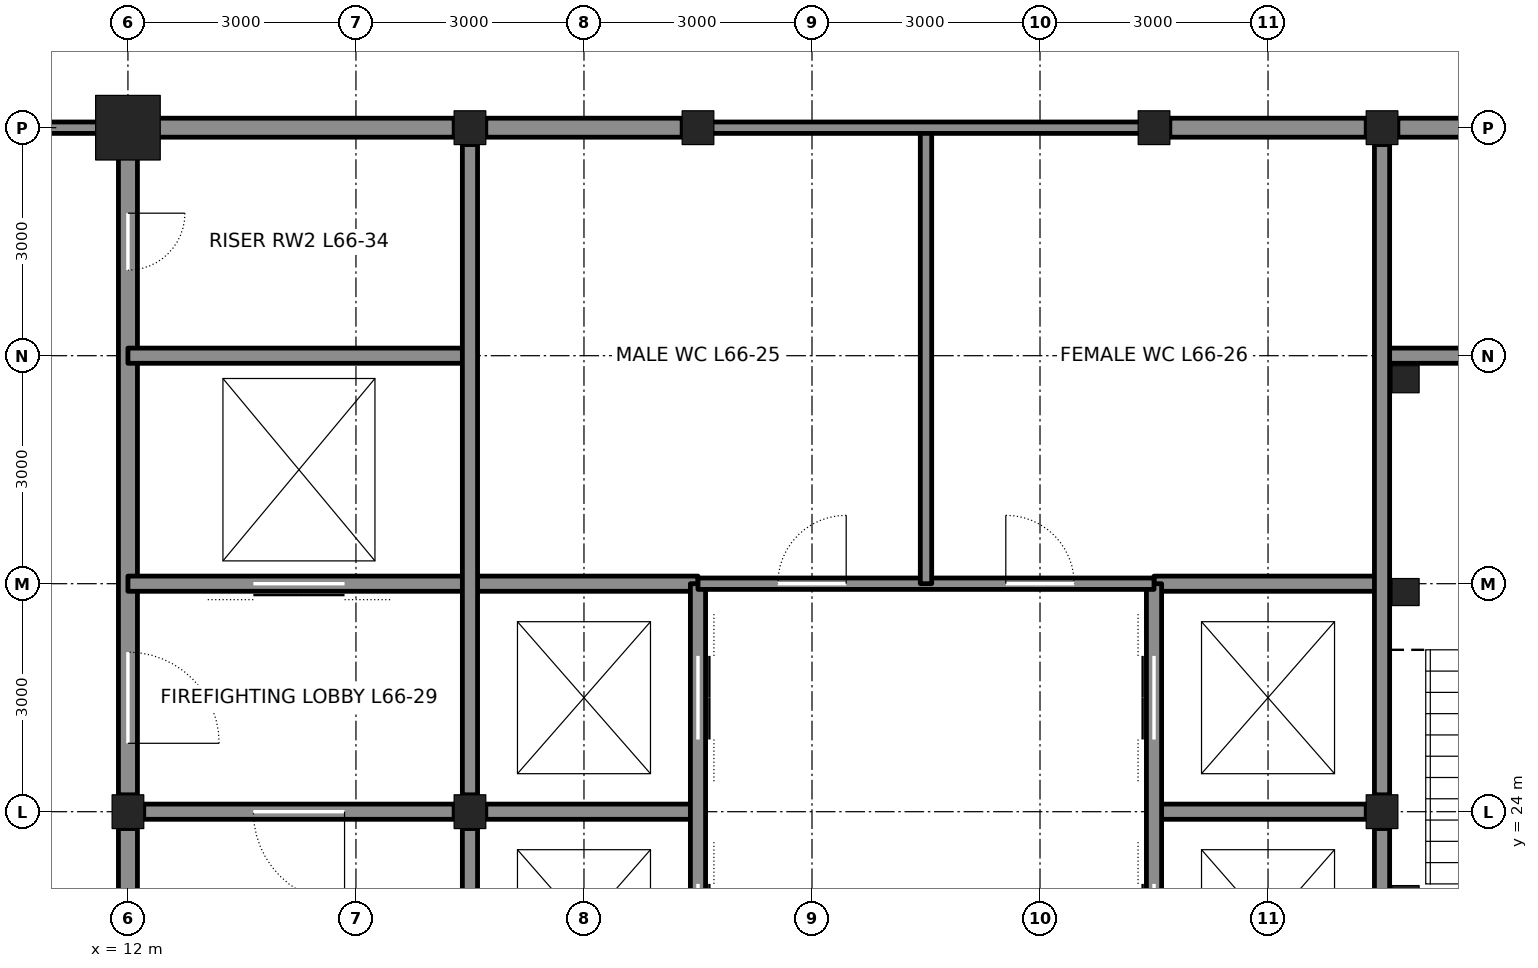
"""IFC4 building model, lengths in metres.
Left out: names, types, materials, properties, quantities, classifications, styles, units other than length and angle.
Written with IfcOpenShell. Run it as: python <this file> out.ifc"""

import sys

from ifc_helpers import new_model, si_unit, direction, frame, frame_2d, origin, origin_2d, place, context, subcontext, project, spatial, rectangle, hollow_rectangle, i_section, extrude, element, fill, save


model = new_model("IFC4")
c1 = context("Model", 3, precision=1e-05, world=origin(), true_north=direction((0.0, 1.0)))
c2 = subcontext(c1, "Body", "Model", "MODEL_VIEW")
j1 = project(units=[si_unit("LENGTHUNIT", "METRE"), si_unit("PLANEANGLEUNIT", "RADIAN")], contexts=[c1])
p1 = place(None, origin())
s1 = spatial("IfcSite", under=j1, at=p1, CompositionType="ELEMENT")
p2 = place(p1, origin())
s2 = spatial("IfcBuilding", under=s1, at=p2, CompositionType="ELEMENT")
p3 = place(p2, frame((0.0, 0.0, 295.8)))
s3 = spatial("IfcBuildingStorey", under=s2, at=p3, CompositionType="ELEMENT", Elevation=295.8)
p4 = place(p3, frame((12.0, 33.0, 0.0), z_axis=(0.0, 0.0, 1.0), x_axis=(1.0, 0.0, 0.0)))
e1 = element("IfcColumn", 1, at=p4, inside=s3, PredefinedType="COLUMN", context=c2, shape_type="SweptSolid", body=[
    extrude(hollow_rectangle(XDim=0.85, YDim=0.85, WallThickness=0.085, at=origin_2d()), origin(), (0.0, 0.0, 1.0), 4.2),
])
for number, where, z_axis, x_axis in (
    (2, (16.5, 33.0, 0.0), (0.0, 0.0, 1.0), (1.0, 0.0, 0.0)),
    (3, (19.5, 33.0, 0.0), (0.0, 0.0, 1.0), (1.0, 0.0, 0.0)),
    (4, (25.5, 33.0, 0.0), (0.0, 0.0, 1.0), (1.0, 0.0, 0.0)),
    (5, (28.5, 33.0, 0.0), (0.0, 0.0, 1.0), (1.0, 0.0, 0.0)),
    (6, (12.0, 24.0, 0.0), (0.0, 0.0, 1.0), (1.0, 0.0, 0.0)),
    (7, (16.5, 24.0, 0.0), (0.0, 0.0, 1.0), (1.0, 0.0, 0.0)),
    (8, (28.5, 24.0, 0.0), (0.0, 0.0, 1.0), (1.0, 0.0, 0.0)),
):
    element("IfcColumn", number, at=place(p3, frame(where, z_axis=z_axis, x_axis=x_axis)), inside=s3, PredefinedType="COLUMN", context=c2, shape_type="SweptSolid", body=[
        extrude(i_section(OverallWidth=0.417, OverallDepth=0.445, WebThickness=0.039, FlangeThickness=0.063, at=origin_2d()), origin(), (0.0, 0.0, 1.0), 4.2),
    ])
p5 = place(p3, frame((12.0, 21.222, 0.0), z_axis=(0.0, 0.0, 1.0), x_axis=(0.0, 1.0, 0.0)))
e9 = element("IfcWall", 9, at=p5, inside=s3, PredefinedType="SOLIDWALL", context=c2, shape_type="SweptSolid", body=[
    extrude(rectangle(XDim=2.555, YDim=0.25, at=frame_2d((1.278, 0.0))), origin(), (0.0, 0.0, 1.0), 3.113),
])
p6 = place(p3, frame((12.0, 24.222, 0.0), z_axis=(0.0, 0.0, 1.0), x_axis=(0.0, 1.0, 0.0)))
e10 = element("IfcWall", 10, at=p6, inside=s3, PredefinedType="SOLIDWALL", context=c2, shape_type="SweptSolid", body=[
    extrude(rectangle(XDim=8.528, YDim=0.25, at=frame_2d((4.264, 0.0))), origin(), (0.0, 0.0, 1.0), 3.113),
])
p7 = place(p6, frame((0.678, 0.0, 0.0)))
e11 = element("IfcOpeningElement", 11, at=p7, cuts=e10, PredefinedType="OPENING", context=c2, shape_type="SweptSolid", body=[
    extrude(rectangle(XDim=1.2, YDim=2.1, at=frame_2d((0.6, 1.05))), frame((0.0, 0.135, 0.0), z_axis=(0.0, -1.0, 0.0), x_axis=(1.0, 0.0, 0.0)), (0.0, 0.0, 1.0), 0.27),
])
p8 = place(p6, frame((6.903, 0.0, 0.0)))
e12 = element("IfcOpeningElement", 12, at=p8, cuts=e10, PredefinedType="OPENING", context=c2, shape_type="SweptSolid", body=[
    extrude(rectangle(XDim=0.75, YDim=2.1, at=frame_2d((0.375, 1.05))), frame((0.0, 0.135, 0.0), z_axis=(0.0, -1.0, 0.0), x_axis=(1.0, 0.0, 0.0)), (0.0, 0.0, 1.0), 0.27),
])
p9 = place(p3, frame((12.208, 24.0, 0.0), z_axis=(0.0, 0.0, 1.0), x_axis=(1.0, 0.0, 0.0)))
e13 = element("IfcWall", 13, at=p9, inside=s3, PredefinedType="SOLIDWALL", context=c2, shape_type="SweptSolid", body=[
    extrude(rectangle(XDim=4.083, YDim=0.2, at=frame_2d((2.042, 0.0))), origin(), (0.0, 0.0, 1.0), 3.09),
])
p10 = place(p9, frame((1.442, 0.0, 0.0)))
e14 = element("IfcOpeningElement", 14, at=p10, cuts=e13, PredefinedType="OPENING", context=c2, shape_type="SweptSolid", body=[
    extrude(rectangle(XDim=1.2, YDim=2.1, at=frame_2d((0.6, 1.05))), frame((0.0, 0.11, 0.0), z_axis=(0.0, -1.0, 0.0), x_axis=(1.0, 0.0, 0.0)), (0.0, 0.0, 1.0), 0.22),
])
for number, where, z_axis, x_axis in (
    (15, (16.708, 24.0, 0.0), (0.0, 0.0, 1.0), (1.0, 0.0, 0.0)),
    (16, (25.5, 24.0, 0.0), (0.0, 0.0, 1.0), (1.0, 0.0, 0.0)),
):
    element("IfcWall", number, at=place(p3, frame(where, z_axis=z_axis, x_axis=x_axis)), inside=s3, PredefinedType="SOLIDWALL", context=c2, shape_type="SweptSolid", body=[
        extrude(rectangle(XDim=2.792, YDim=0.2, at=frame_2d((1.396, 0.0))), origin(), (0.0, 0.0, 1.0), 3.09),
    ])
p11 = place(p3, frame((12.0, 27.0, 0.0), z_axis=(0.0, 0.0, 1.0), x_axis=(1.0, 0.0, 0.0)))
e17 = element("IfcWall", 17, at=p11, inside=s3, PredefinedType="SOLIDWALL", context=c2, shape_type="SweptSolid", body=[
    extrude(rectangle(XDim=7.5, YDim=0.2, at=frame_2d((3.75, 0.0))), origin(), (0.0, 0.0, 1.0), 4.04),
])
p12 = place(p11, frame((1.65, 0.0, 0.0)))
e18 = element("IfcOpeningElement", 18, at=p12, cuts=e17, PredefinedType="OPENING", context=c2, shape_type="SweptSolid", body=[
    extrude(rectangle(XDim=1.2, YDim=2.1, at=frame_2d((0.6, 1.05))), frame((0.0, 0.11, 0.0), z_axis=(0.0, -1.0, 0.0), x_axis=(1.0, 0.0, 0.0)), (0.0, 0.0, 1.0), 0.22),
])
p13 = place(p3, frame((25.5, 27.0, 0.0), z_axis=(0.0, 0.0, 1.0), x_axis=(1.0, 0.0, 0.0)))
e19 = element("IfcWall", 19, at=p13, inside=s3, PredefinedType="SOLIDWALL", context=c2, shape_type="SweptSolid", body=[
    extrude(rectangle(XDim=3.0, YDim=0.2, at=frame_2d((1.5, 0.0))), origin(), (0.0, 0.0, 1.0), 4.04),
])
for number, where, z_axis, x_axis in (
    (20, (12.0, 30.0, 0.0), (0.0, 0.0, 1.0), (1.0, 0.0, 0.0)),
    (21, (28.5, 30.0, 0.0), (0.0, 0.0, 1.0), (1.0, 0.0, 0.0)),
):
    element("IfcWall", number, at=place(p3, frame(where, z_axis=z_axis, x_axis=x_axis)), inside=s3, PredefinedType="SOLIDWALL", context=c2, shape_type="SweptSolid", body=[
        extrude(rectangle(XDim=4.5, YDim=0.2, at=frame_2d((2.25, 0.0))), origin(), (0.0, 0.0, 1.0), 4.04),
    ])
p14 = place(p3, frame((12.25, 33.0, 0.0), z_axis=(0.0, 0.0, 1.0), x_axis=(1.0, 0.0, 0.0)))
e22 = element("IfcWall", 22, at=p14, inside=s3, PredefinedType="SOLIDWALL", context=c2, shape_type="SweptSolid", body=[
    extrude(rectangle(XDim=4.042, YDim=0.25, at=frame_2d((2.021, 0.0))), origin(), (0.0, 0.0, 1.0), 3.181),
])
for number, where, z_axis, x_axis in (
    (23, (16.708, 33.0, 0.0), (0.0, 0.0, 1.0), (1.0, 0.0, 0.0)),
    (24, (25.708, 33.0, 0.0), (0.0, 0.0, 1.0), (1.0, 0.0, 0.0)),
):
    element("IfcWall", number, at=place(p3, frame(where, z_axis=z_axis, x_axis=x_axis)), inside=s3, PredefinedType="SOLIDWALL", context=c2, shape_type="SweptSolid", body=[
        extrude(rectangle(XDim=2.583, YDim=0.25, at=frame_2d((1.292, 0.0))), origin(), (0.0, 0.0, 1.0), 3.181),
    ])
p15 = place(p3, frame((28.708, 33.0, 0.0), z_axis=(0.0, 0.0, 1.0), x_axis=(1.0, 0.0, 0.0)))
e25 = element("IfcWall", 25, at=p15, inside=s3, PredefinedType="SOLIDWALL", context=c2, shape_type="SweptSolid", body=[
    extrude(rectangle(XDim=4.042, YDim=0.25, at=frame_2d((2.021, 0.0))), origin(), (0.0, 0.0, 1.0), 3.181),
])
p16 = place(p3, frame((16.5, 21.222, 0.0), z_axis=(0.0, 0.0, 1.0), x_axis=(0.0, 1.0, 0.0)))
e26 = element("IfcWall", 26, at=p16, inside=s3, PredefinedType="SOLIDWALL", context=c2, shape_type="SweptSolid", body=[
    extrude(rectangle(XDim=2.555, YDim=0.2, at=frame_2d((1.278, 0.0))), origin(), (0.0, 0.0, 1.0), 3.113),
])
p17 = place(p3, frame((16.5, 24.222, 0.0), z_axis=(0.0, 0.0, 1.0), x_axis=(0.0, 1.0, 0.0)))
e27 = element("IfcWall", 27, at=p17, inside=s3, PredefinedType="SOLIDWALL", context=c2, shape_type="SweptSolid", body=[
    extrude(rectangle(XDim=8.555, YDim=0.2, at=frame_2d((4.278, 0.0))), origin(), (0.0, 0.0, 1.0), 3.113),
])
p18 = place(p3, frame((19.5, 15.0, 0.0), z_axis=(0.0, 0.0, 1.0), x_axis=(0.0, 1.0, 0.0)))
e28 = element("IfcWall", 28, at=p18, inside=s3, PredefinedType="SOLIDWALL", context=c2, shape_type="SweptSolid", body=[
    extrude(rectangle(XDim=12.0, YDim=0.2, at=frame_2d((6.0, 0.0))), origin(), (0.0, 0.0, 1.0), 3.064),
])
p19 = place(p18, frame((0.95, 0.0, 0.0)))
e29 = element("IfcOpeningElement", 29, at=p19, cuts=e28, PredefinedType="OPENING", context=c2, shape_type="SweptSolid", body=[
    extrude(rectangle(XDim=1.1, YDim=2.1, at=frame_2d((0.55, 1.05))), frame((0.0, 0.11, 0.0), z_axis=(0.0, -1.0, 0.0), x_axis=(1.0, 0.0, 0.0)), (0.0, 0.0, 1.0), 0.22),
])
p20 = place(p18, frame((3.95, 0.0, 0.0)))
e30 = element("IfcOpeningElement", 30, at=p20, cuts=e28, PredefinedType="OPENING", context=c2, shape_type="SweptSolid", body=[
    extrude(rectangle(XDim=1.1, YDim=2.1, at=frame_2d((0.55, 1.05))), frame((0.0, 0.11, 0.0), z_axis=(0.0, -1.0, 0.0), x_axis=(1.0, 0.0, 0.0)), (0.0, 0.0, 1.0), 0.22),
])
p21 = place(p18, frame((6.95, 0.0, 0.0)))
e31 = element("IfcOpeningElement", 31, at=p21, cuts=e28, PredefinedType="OPENING", context=c2, shape_type="SweptSolid", body=[
    extrude(rectangle(XDim=1.1, YDim=2.1, at=frame_2d((0.55, 1.05))), frame((0.0, 0.11, 0.0), z_axis=(0.0, -1.0, 0.0), x_axis=(1.0, 0.0, 0.0)), (0.0, 0.0, 1.0), 0.22),
])
p22 = place(p18, frame((9.95, 0.0, 0.0)))
e32 = element("IfcOpeningElement", 32, at=p22, cuts=e28, PredefinedType="OPENING", context=c2, shape_type="SweptSolid", body=[
    extrude(rectangle(XDim=1.1, YDim=2.1, at=frame_2d((0.55, 1.05))), frame((0.0, 0.11, 0.0), z_axis=(0.0, -1.0, 0.0), x_axis=(1.0, 0.0, 0.0)), (0.0, 0.0, 1.0), 0.22),
])
p23 = place(p3, frame((25.5, 15.0, 0.0), z_axis=(0.0, 0.0, 1.0), x_axis=(0.0, 1.0, 0.0)))
e33 = element("IfcWall", 33, at=p23, inside=s3, PredefinedType="SOLIDWALL", context=c2, shape_type="SweptSolid", body=[
    extrude(rectangle(XDim=12.0, YDim=0.2, at=frame_2d((6.0, 0.0))), origin(), (0.0, 0.0, 1.0), 3.064),
])
p24 = place(p23, frame((1.8, 0.0, 0.0)))
e34 = element("IfcOpeningElement", 34, at=p24, cuts=e33, PredefinedType="OPENING", context=c2, shape_type="SweptSolid", body=[
    extrude(rectangle(XDim=0.9, YDim=2.1, at=frame_2d((0.45, 1.05))), frame((0.0, 0.11, 0.0), z_axis=(0.0, -1.0, 0.0), x_axis=(1.0, 0.0, 0.0)), (0.0, 0.0, 1.0), 0.22),
])
p25 = place(p23, frame((4.8, 0.0, 0.0)))
e35 = element("IfcOpeningElement", 35, at=p25, cuts=e33, PredefinedType="OPENING", context=c2, shape_type="SweptSolid", body=[
    extrude(rectangle(XDim=0.9, YDim=2.1, at=frame_2d((0.45, 1.05))), frame((0.0, 0.11, 0.0), z_axis=(0.0, -1.0, 0.0), x_axis=(1.0, 0.0, 0.0)), (0.0, 0.0, 1.0), 0.22),
])
p26 = place(p23, frame((6.95, 0.0, 0.0)))
e36 = element("IfcOpeningElement", 36, at=p26, cuts=e33, PredefinedType="OPENING", context=c2, shape_type="SweptSolid", body=[
    extrude(rectangle(XDim=1.1, YDim=2.1, at=frame_2d((0.55, 1.05))), frame((0.0, 0.11, 0.0), z_axis=(0.0, -1.0, 0.0), x_axis=(1.0, 0.0, 0.0)), (0.0, 0.0, 1.0), 0.22),
])
p27 = place(p23, frame((9.95, 0.0, 0.0)))
e37 = element("IfcOpeningElement", 37, at=p27, cuts=e33, PredefinedType="OPENING", context=c2, shape_type="SweptSolid", body=[
    extrude(rectangle(XDim=1.1, YDim=2.1, at=frame_2d((0.55, 1.05))), frame((0.0, 0.11, 0.0), z_axis=(0.0, -1.0, 0.0), x_axis=(1.0, 0.0, 0.0)), (0.0, 0.0, 1.0), 0.22),
])
p28 = place(p3, frame((28.5, 21.222, 0.0), z_axis=(0.0, 0.0, 1.0), x_axis=(0.0, 1.0, 0.0)))
e38 = element("IfcWall", 38, at=p28, inside=s3, PredefinedType="SOLIDWALL", context=c2, shape_type="SweptSolid", body=[
    extrude(rectangle(XDim=2.555, YDim=0.2, at=frame_2d((1.278, 0.0))), origin(), (0.0, 0.0, 1.0), 3.113),
])
p29 = place(p3, frame((28.5, 24.222, 0.0), z_axis=(0.0, 0.0, 1.0), x_axis=(0.0, 1.0, 0.0)))
e39 = element("IfcWall", 39, at=p29, inside=s3, PredefinedType="SOLIDWALL", context=c2, shape_type="SweptSolid", body=[
    extrude(rectangle(XDim=8.555, YDim=0.2, at=frame_2d((4.278, 0.0))), origin(), (0.0, 0.0, 1.0), 3.113),
])
p30 = place(p3, frame((19.5, 27.0, 0.0), z_axis=(0.0, 0.0, 1.0), x_axis=(1.0, 0.0, 0.0)))
e40 = element("IfcWall", 40, at=p30, inside=s3, PredefinedType="PARTITIONING", context=c2, shape_type="SweptSolid", body=[
    extrude(rectangle(XDim=6.0, YDim=0.15, at=frame_2d((3.0, 0.0))), origin(), (0.0, 0.0, 1.0), 4.04),
])
p31 = place(p30, frame((1.05, 0.0, 0.0)))
e41 = element("IfcOpeningElement", 41, at=p31, cuts=e40, PredefinedType="OPENING", context=c2, shape_type="SweptSolid", body=[
    extrude(rectangle(XDim=0.9, YDim=2.1, at=frame_2d((0.45, 1.05))), frame((0.0, 0.085, 0.0), z_axis=(0.0, -1.0, 0.0), x_axis=(1.0, 0.0, 0.0)), (0.0, 0.0, 1.0), 0.17),
])
p32 = place(p30, frame((4.05, 0.0, 0.0)))
e42 = element("IfcOpeningElement", 42, at=p32, cuts=e40, PredefinedType="OPENING", context=c2, shape_type="SweptSolid", body=[
    extrude(rectangle(XDim=0.9, YDim=2.1, at=frame_2d((0.45, 1.05))), frame((0.0, 0.085, 0.0), z_axis=(0.0, -1.0, 0.0), x_axis=(1.0, 0.0, 0.0)), (0.0, 0.0, 1.0), 0.17),
])
p33 = place(p3, frame((22.5, 27.0, 0.0), z_axis=(0.0, 0.0, 1.0), x_axis=(0.0, 1.0, 0.0)))
e43 = element("IfcWall", 43, at=p33, inside=s3, PredefinedType="PARTITIONING", context=c2, shape_type="SweptSolid", body=[
    extrude(rectangle(XDim=6.0, YDim=0.15, at=frame_2d((3.0, 0.0))), origin(), (0.0, 0.0, 1.0), 4.04),
])
p34 = place(p3, frame((19.5, 33.0, 0.0), z_axis=(0.0, 0.0, 1.0), x_axis=(1.0, 0.0, 0.0)))
e44 = element("IfcWall", 44, at=p34, inside=s3, PredefinedType="PARTITIONING", context=c2, shape_type="SweptSolid", body=[
    extrude(rectangle(XDim=6.0, YDim=0.15, at=frame_2d((3.0, 0.0))), origin(), (0.0, 0.0, 1.0), 3.181),
])
p35 = place(p3, frame((10.2, 33.0, 0.0), z_axis=(0.0, 0.0, 1.0), x_axis=(1.0, 0.0, 0.0)))
e45 = element("IfcWall", 45, at=p35, inside=s3, PredefinedType="PARTITIONING", context=c2, shape_type="SweptSolid", body=[
    extrude(rectangle(XDim=1.8, YDim=0.15, at=frame_2d((0.9, 0.0))), origin(), (0.0, 0.0, 1.0), 3.093),
])
for number, where, z_axis, x_axis in (
    (46, (28.81, 29.69, 0.0), (0.0, 0.0, 1.0), (1.0, 0.0, 0.0)),
    (47, (28.81, 26.89, 0.0), (0.0, 0.0, 1.0), (1.0, 0.0, 0.0)),
    (48, (28.81, 22.85, 0.0), (0.0, 0.0, 1.0), (1.0, 0.0, 0.0)),
):
    element("IfcColumn", number, at=place(p3, frame(where, z_axis=z_axis, x_axis=x_axis)), inside=s3, PredefinedType="COLUMN", context=c2, shape_type="SweptSolid", body=[
        extrude(hollow_rectangle(XDim=0.356, YDim=0.356, WallThickness=0.009, at=origin_2d()), origin(), (0.0, 0.0, 1.0), 4.2),
    ])
p36 = place(p10, frame((1.2, 0.0, 0.0), z_axis=(0.0, 0.0, 1.0), x_axis=(-1.0, 0.0, 0.0)))
e49 = element("IfcDoor", 49, at=p36, inside=s3, OperationType="SINGLE_SWING_LEFT", PredefinedType="DOOR", context=c2, shape_type="SweptSolid", body=[
    extrude(rectangle(XDim=1.2, YDim=2.1, at=frame_2d((0.6, 1.05))), frame((0.0, 0.025, 0.0), z_axis=(0.0, -1.0, 0.0), x_axis=(1.0, 0.0, 0.0)), (0.0, 0.0, 1.0), 0.05),
])
fill(e14, e49)
p37 = place(p7, frame((1.2, 0.0, 0.0), z_axis=(0.0, 0.0, 1.0), x_axis=(-1.0, 0.0, 0.0)))
e50 = element("IfcDoor", 50, at=p37, inside=s3, OperationType="SINGLE_SWING_RIGHT", PredefinedType="DOOR", context=c2, shape_type="SweptSolid", body=[
    extrude(rectangle(XDim=1.2, YDim=2.1, at=frame_2d((0.6, 1.05))), frame((0.0, 0.025, 0.0), z_axis=(0.0, -1.0, 0.0), x_axis=(1.0, 0.0, 0.0)), (0.0, 0.0, 1.0), 0.05),
])
fill(e11, e50)
p38 = place(p12, origin())
e51 = element("IfcDoor", 51, at=p38, inside=s3, OperationType="DOUBLE_DOOR_SLIDING", PredefinedType="DOOR", context=c2, shape_type="SweptSolid", body=[
    extrude(rectangle(XDim=1.2, YDim=2.1, at=frame_2d((0.6, 1.05))), frame((0.0, 0.025, 0.0), z_axis=(0.0, -1.0, 0.0), x_axis=(1.0, 0.0, 0.0)), (0.0, 0.0, 1.0), 0.05),
])
fill(e18, e51)
p39 = place(p8, frame((0.75, 0.0, 0.0), z_axis=(0.0, 0.0, 1.0), x_axis=(-1.0, 0.0, 0.0)))
e52 = element("IfcDoor", 52, at=p39, inside=s3, OperationType="SINGLE_SWING_LEFT", PredefinedType="DOOR", context=c2, shape_type="SweptSolid", body=[
    extrude(rectangle(XDim=0.75, YDim=2.1, at=frame_2d((0.375, 1.05))), frame((0.0, 0.025, 0.0), z_axis=(0.0, -1.0, 0.0), x_axis=(1.0, 0.0, 0.0)), (0.0, 0.0, 1.0), 0.05),
])
fill(e12, e52)
p40 = place(p31, origin())
e53 = element("IfcDoor", 53, at=p40, inside=s3, OperationType="SINGLE_SWING_RIGHT", PredefinedType="DOOR", context=c2, shape_type="SweptSolid", body=[
    extrude(rectangle(XDim=0.9, YDim=2.1, at=frame_2d((0.45, 1.05))), frame((0.0, 0.025, 0.0), z_axis=(0.0, -1.0, 0.0), x_axis=(1.0, 0.0, 0.0)), (0.0, 0.0, 1.0), 0.05),
])
fill(e41, e53)
p41 = place(p32, origin())
e54 = element("IfcDoor", 54, at=p41, inside=s3, OperationType="SINGLE_SWING_LEFT", PredefinedType="DOOR", context=c2, shape_type="SweptSolid", body=[
    extrude(rectangle(XDim=0.9, YDim=2.1, at=frame_2d((0.45, 1.05))), frame((0.0, 0.025, 0.0), z_axis=(0.0, -1.0, 0.0), x_axis=(1.0, 0.0, 0.0)), (0.0, 0.0, 1.0), 0.05),
])
fill(e42, e54)
p42 = place(p21, origin())
e55 = element("IfcDoor", 55, at=p42, inside=s3, OperationType="DOUBLE_DOOR_SLIDING", PredefinedType="DOOR", context=c2, shape_type="SweptSolid", body=[
    extrude(rectangle(XDim=1.1, YDim=2.1, at=frame_2d((0.55, 1.05))), frame((0.0, 0.025, 0.0), z_axis=(0.0, -1.0, 0.0), x_axis=(1.0, 0.0, 0.0)), (0.0, 0.0, 1.0), 0.05),
])
fill(e31, e55)
p43 = place(p26, origin())
e56 = element("IfcDoor", 56, at=p43, inside=s3, OperationType="DOUBLE_DOOR_SLIDING", PredefinedType="DOOR", context=c2, shape_type="SweptSolid", body=[
    extrude(rectangle(XDim=1.1, YDim=2.1, at=frame_2d((0.55, 1.05))), frame((0.0, 0.025, 0.0), z_axis=(0.0, -1.0, 0.0), x_axis=(1.0, 0.0, 0.0)), (0.0, 0.0, 1.0), 0.05),
])
fill(e36, e56)
p44 = place(p22, origin())
e57 = element("IfcDoor", 57, at=p44, inside=s3, OperationType="DOUBLE_DOOR_SLIDING", PredefinedType="DOOR", context=c2, shape_type="SweptSolid", body=[
    extrude(rectangle(XDim=1.1, YDim=2.1, at=frame_2d((0.55, 1.05))), frame((0.0, 0.025, 0.0), z_axis=(0.0, -1.0, 0.0), x_axis=(1.0, 0.0, 0.0)), (0.0, 0.0, 1.0), 0.05),
])
fill(e32, e57)
p45 = place(p27, origin())
e58 = element("IfcDoor", 58, at=p45, inside=s3, OperationType="DOUBLE_DOOR_SLIDING", PredefinedType="DOOR", context=c2, shape_type="SweptSolid", body=[
    extrude(rectangle(XDim=1.1, YDim=2.1, at=frame_2d((0.55, 1.05))), frame((0.0, 0.025, 0.0), z_axis=(0.0, -1.0, 0.0), x_axis=(1.0, 0.0, 0.0)), (0.0, 0.0, 1.0), 0.05),
])
fill(e37, e58)
save(model, sys.argv[1])
